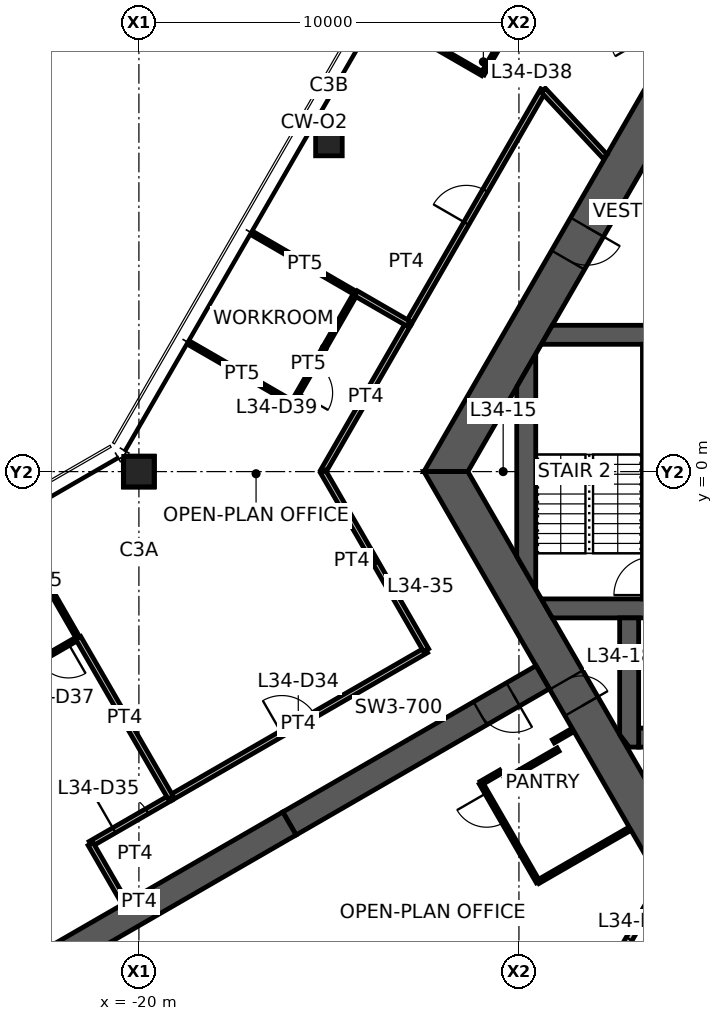
"""IFC4 building model, lengths in metres.
Left out: names, types, materials, properties, quantities, classifications, styles, units other than length and angle.
Written with IfcOpenShell. Run it as: python <this file> out.ifc"""

import sys

from ifc_helpers import new_model, si_unit, direction, frame, frame_2d, origin, origin_2d, place, context, subcontext, project, spatial, polyline, rectangle, hollow_rectangle, outline, extrude, element, fill, save


model = new_model("IFC4")
c1 = context("Model", 3, precision=1e-05, world=origin(), true_north=direction((0.0, 1.0)))
c2 = subcontext(c1, "Body", "Model", "MODEL_VIEW")
j1 = project(units=[si_unit("LENGTHUNIT", "METRE"), si_unit("PLANEANGLEUNIT", "RADIAN")], contexts=[c1])
p1 = place(None, origin())
s1 = spatial("IfcSite", under=j1, at=p1, CompositionType="ELEMENT")
p2 = place(p1, origin())
s2 = spatial("IfcBuilding", under=s1, at=p2, CompositionType="ELEMENT")
p3 = place(p2, frame((0.0, 0.0, 137.0)))
s3 = spatial("IfcBuildingStorey", under=s2, at=p3, CompositionType="ELEMENT", Elevation=137.0)
p4 = place(p3, frame((-20.0, 0.0, 0.0), z_axis=(0.0, 0.0, 1.0), x_axis=(1.0, 0.0, 0.0)))
e1 = element("IfcColumn", 1, at=p4, inside=s3, PredefinedType="COLUMN", context=c2, shape_type="SweptSolid", body=[
    extrude(hollow_rectangle(XDim=0.8, YDim=0.8, WallThickness=0.045, at=origin_2d()), origin(), (0.0, 0.0, 1.0), 3.9),
])
p5 = place(p3, frame((-15.0, 8.66, 0.0), z_axis=(0.0, 0.0, 1.0), x_axis=(1.0, 0.0, 0.0)))
e2 = element("IfcColumn", 2, at=p5, inside=s3, PredefinedType="COLUMN", context=c2, shape_type="SweptSolid", body=[
    extrude(hollow_rectangle(XDim=0.7, YDim=0.7, WallThickness=0.036, at=origin_2d()), origin(), (0.0, 0.0, 1.0), 3.9),
])
p6 = place(p3, frame((-5.961, 10.325, 0.0), z_axis=(0.0, 0.0, 1.0), x_axis=(-0.500004296715, -0.866022923061, 0.0)))
e3 = element("IfcWall", 3, at=p6, inside=s3, PredefinedType="SHEAR", context=c2, shape_type="SweptSolid", body=[
    extrude(outline(polyline([(-0.289, -0.5), (4.494, -0.5), (5.494, -0.5), (12.211, -0.5), (11.634, 0.5), (5.494, 0.5), (4.494, 0.5), (0.289, 0.5), (-0.289, -0.5)])), origin(), (0.0, 0.0, 1.0), 3.9),
])
p7 = place(p6, frame((4.494, 0.0, 0.0)))
e4 = element("IfcOpeningElement", 4, at=p7, cuts=e3, PredefinedType="OPENING", context=c2, shape_type="SweptSolid", body=[
    extrude(rectangle(XDim=1.0, YDim=2.1, at=frame_2d((0.5, 1.05))), frame((0.0, 0.51, 0.0), z_axis=(0.0, -1.0, 0.0), x_axis=(1.0, 0.0, 0.0)), (0.0, 0.0, 1.0), 1.02),
])
p8 = place(p3, frame((-11.922, 0.0, 0.0), z_axis=(0.0, 0.0, 1.0), x_axis=(0.500004296715, -0.866022923061, 0.0)))
e5 = element("IfcWall", 5, at=p8, inside=s3, PredefinedType="SHEAR", context=c2, shape_type="SweptSolid", body=[
    extrude(outline(polyline([(-0.289, -0.5), (6.331, -0.5), (7.131, -0.5), (12.211, -0.5), (11.634, 0.5), (7.131, 0.5), (6.331, 0.5), (0.289, 0.5), (-0.289, -0.5)])), origin(), (0.0, 0.0, 1.0), 3.9),
])
p9 = place(p8, frame((6.331, 0.0, 0.0)))
e6 = element("IfcOpeningElement", 6, at=p9, cuts=e5, PredefinedType="OPENING", context=c2, shape_type="SweptSolid", body=[
    extrude(rectangle(XDim=0.8, YDim=2.1, at=frame_2d((0.4, 1.05))), frame((0.0, 0.51, 0.0), z_axis=(0.0, -1.0, 0.0), x_axis=(1.0, 0.0, 0.0)), (0.0, 0.0, 1.0), 1.02),
])
p10 = place(p3, frame((-9.375, -5.413, 0.0), z_axis=(0.0, 0.0, 1.0), x_axis=(-0.866032377459, -0.499987921047, 0.0)))
e7 = element("IfcWall", 7, at=p10, inside=s3, PredefinedType="SHEAR", context=c2, shape_type="SweptSolid", body=[
    extrude(rectangle(XDim=7.696, YDim=0.7, at=frame_2d((3.848, 0.0))), origin(), (0.0, 0.0, 1.0), 3.9),
])
p11 = place(p10, frame((0.9, 0.0, 0.0)))
e8 = element("IfcOpeningElement", 8, at=p11, cuts=e7, PredefinedType="OPENING", context=c2, shape_type="SweptSolid", body=[
    extrude(rectangle(XDim=1.0, YDim=2.1, at=frame_2d((0.5, 1.05))), frame((0.0, 0.36, 0.0), z_axis=(0.0, -1.0, 0.0), x_axis=(1.0, 0.0, 0.0)), (0.0, 0.0, 1.0), 0.72),
])
p12 = place(p3, frame((-16.039, -9.26, 0.0), z_axis=(0.0, 0.0, 1.0), x_axis=(-0.866024837091, -0.50000098154, 0.0)))
e9 = element("IfcWall", 9, at=p12, inside=s3, PredefinedType="SHEAR", context=c2, shape_type="SweptSolid", body=[
    extrude(rectangle(XDim=13.0, YDim=0.7, at=frame_2d((6.5, 0.0))), origin(), (0.0, 0.0, 1.0), 3.9),
])
p13 = place(p3, frame((-9.266, 3.6, 0.0), z_axis=(0.0, 0.0, 1.0), x_axis=(1.0, 0.0, 0.0)))
e10 = element("IfcWall", 10, at=p13, inside=s3, PredefinedType="SHEAR", context=c2, shape_type="SweptSolid", body=[
    extrude(outline(polyline([(-0.144, -0.25), (3.266, -0.25), (4.266, -0.25), (5.667, -0.25), (6.767, -0.25), (7.916, -0.25), (7.916, 0.25), (6.767, 0.25), (5.667, 0.25), (4.266, 0.25), (3.266, 0.25), (0.144, 0.25), (-0.144, -0.25)])), origin(), (0.0, 0.0, 1.0), 3.9),
])
p14 = place(p13, frame((3.266, 0.0, 0.0)))
e11 = element("IfcOpeningElement", 11, at=p14, cuts=e10, PredefinedType="OPENING", context=c2, shape_type="SweptSolid", body=[
    extrude(rectangle(XDim=1.0, YDim=2.1, at=frame_2d((0.5, 1.05))), frame((0.0, 0.26, 0.0), z_axis=(0.0, -1.0, 0.0), x_axis=(1.0, 0.0, 0.0)), (0.0, 0.0, 1.0), 0.52),
])
p15 = place(p13, frame((5.667, 0.0, 0.0)))
e12 = element("IfcOpeningElement", 12, at=p15, cuts=e10, PredefinedType="OPENING", context=c2, shape_type="SweptSolid", body=[
    extrude(rectangle(XDim=1.1, YDim=2.1, at=frame_2d((0.55, 1.05))), frame((0.0, 0.26, 0.0), z_axis=(0.0, -1.0, 0.0), x_axis=(1.0, 0.0, 0.0)), (0.0, 0.0, 1.0), 0.52),
])
p16 = place(p3, frame((-9.266, -3.6, 0.0), z_axis=(0.0, 0.0, 1.0), x_axis=(1.0, 0.0, 0.0)))
e13 = element("IfcWall", 13, at=p16, inside=s3, PredefinedType="SHEAR", context=c2, shape_type="SweptSolid", body=[
    extrude(outline(polyline([(0.144, -0.25), (3.116, -0.25), (4.417, -0.25), (5.667, -0.25), (6.767, -0.25), (7.916, -0.25), (7.916, 0.25), (6.767, 0.25), (5.667, 0.25), (4.417, 0.25), (3.116, 0.25), (-0.144, 0.25), (0.144, -0.25)])), origin(), (0.0, 0.0, 1.0), 3.9),
])
p17 = place(p16, frame((5.667, 0.0, 0.0)))
e14 = element("IfcOpeningElement", 14, at=p17, cuts=e13, PredefinedType="OPENING", context=c2, shape_type="SweptSolid", body=[
    extrude(rectangle(XDim=1.1, YDim=2.1, at=frame_2d((0.55, 1.05))), frame((0.0, 0.26, 0.0), z_axis=(0.0, -1.0, 0.0), x_axis=(1.0, 0.0, 0.0)), (0.0, 0.0, 1.0), 0.52),
])
p18 = place(p16, frame((3.116, 0.0, 0.0)))
e15 = element("IfcOpeningElement", 15, at=p18, cuts=e13, PredefinedType="OPENING", context=c2, shape_type="SweptSolid", body=[
    extrude(rectangle(XDim=1.3, YDim=2.1, at=frame_2d((0.65, 1.05))), frame((0.0, 0.26, 0.0), z_axis=(0.0, -1.0, 0.0), x_axis=(1.0, 0.0, 0.0)), (0.0, 0.0, 1.0), 0.52),
])
p19 = place(p3, frame((-6.5, -3.35, 0.0), z_axis=(0.0, 0.0, 1.0), x_axis=(0.0, 1.0, 0.0)))
e16 = element("IfcWall", 16, at=p19, inside=s3, PredefinedType="SHEAR", context=c2, shape_type="SweptSolid", body=[
    extrude(rectangle(XDim=6.7, YDim=0.5, at=frame_2d((3.35, 0.0))), origin(), (0.0, 0.0, 1.0), 3.9),
])
p20 = place(p19, frame((0.1, 0.0, 0.0)))
e17 = element("IfcOpeningElement", 17, at=p20, cuts=e16, PredefinedType="OPENING", context=c2, shape_type="SweptSolid", body=[
    extrude(rectangle(XDim=1.0, YDim=2.1, at=frame_2d((0.5, 1.05))), frame((0.0, 0.26, 0.0), z_axis=(0.0, -1.0, 0.0), x_axis=(1.0, 0.0, 0.0)), (0.0, 0.0, 1.0), 0.52),
])
p21 = place(p3, frame((-6.85, -7.0, 0.0), z_axis=(0.0, 0.0, 1.0), x_axis=(1.0, 0.0, 0.0)))
e18 = element("IfcWall", 18, at=p21, inside=s3, PredefinedType="SHEAR", context=c2, shape_type="SweptSolid", body=[
    extrude(rectangle(XDim=2.1, YDim=0.5, at=frame_2d((1.05, 0.0))), origin(), (0.0, 0.0, 1.0), 3.9),
])
p22 = place(p3, frame((-7.1, -3.85, 0.0), z_axis=(0.0, 0.0, 1.0), x_axis=(0.0, -1.0, 0.0)))
e19 = element("IfcWall", 19, at=p22, inside=s3, PredefinedType="SHEAR", context=c2, shape_type="SweptSolid", body=[
    extrude(outline(polyline([(0.0, -0.25), (3.069, -0.25), (3.4, 0.0), (3.4, 0.25), (0.0, 0.25), (0.0, -0.25)])), origin(), (0.0, 0.0, 1.0), 3.9),
])
p23 = place(p3, frame((-9.808, -2.662, 0.0), z_axis=(0.0, 0.0, 1.0), x_axis=(0.0, 1.0, 0.0)))
e20 = element("IfcWall", 20, at=p23, inside=s3, PredefinedType="SHEAR", context=c2, shape_type="SweptSolid", body=[
    extrude(outline(polyline([(-0.433, -0.25), (5.758, -0.25), (4.892, 0.25), (0.433, 0.25), (-0.433, -0.25)])), origin(), (0.0, 0.0, 1.0), 3.9),
])
p24 = place(p3, frame((-6.035, 10.453, 0.0), z_axis=(0.0, 0.0, 1.0), x_axis=(-0.499989830942, 0.866031274813, 0.0)))
e21 = element("IfcWall", 21, at=p24, inside=s3, PredefinedType="PARTITIONING", context=c2, shape_type="SweptSolid", body=[
    extrude(rectangle(XDim=7.93, YDim=0.175, at=frame_2d((3.965, 0.0))), origin(), (0.0, 0.0, 1.0), 3.05),
])
p25 = place(p24, frame((1.13, 0.0, 0.0)))
e22 = element("IfcOpeningElement", 22, at=p25, cuts=e21, PredefinedType="OPENING", context=c2, shape_type="SweptSolid", body=[
    extrude(rectangle(XDim=1.0, YDim=2.1, at=frame_2d((0.5, 1.05))), frame((0.0, 0.098, 0.0), z_axis=(0.0, -1.0, 0.0), x_axis=(1.0, 0.0, 0.0)), (0.0, 0.0, 1.0), 0.195),
])
p26 = place(p3, frame((-6.035, -10.453, 0.0), z_axis=(0.0, 0.0, 1.0), x_axis=(-0.499989830942, -0.866031274813, 0.0)))
e23 = element("IfcWall", 23, at=p26, inside=s3, PredefinedType="PARTITIONING", context=c2, shape_type="SweptSolid", body=[
    extrude(rectangle(XDim=7.93, YDim=0.175, at=frame_2d((3.965, 0.0))), origin(), (0.0, 0.0, 1.0), 3.05),
])
p27 = place(p26, frame((1.13, 0.0, 0.0)))
e24 = element("IfcOpeningElement", 24, at=p27, cuts=e23, PredefinedType="OPENING", context=c2, shape_type="SweptSolid", body=[
    extrude(rectangle(XDim=1.0, YDim=2.1, at=frame_2d((0.5, 1.05))), frame((0.0, 0.098, 0.0), z_axis=(0.0, -1.0, 0.0), x_axis=(1.0, 0.0, 0.0)), (0.0, 0.0, 1.0), 0.195),
])
p28 = place(p3, frame((-19.171, -8.586, 0.0), z_axis=(0.0, 0.0, 1.0), x_axis=(0.866007176269, 0.500031569654, 0.0)))
e25 = element("IfcWall", 25, at=p28, inside=s3, PredefinedType="PARTITIONING", context=c2, shape_type="SweptSolid", body=[
    extrude(rectangle(XDim=7.771, YDim=0.15, at=frame_2d((3.885, 0.0))), origin(), (0.0, 0.0, 1.0), 2.95),
])
p29 = place(p28, frame((3.385, 0.0, 0.0)))
e26 = element("IfcOpeningElement", 26, at=p29, cuts=e25, PredefinedType="OPENING", context=c2, shape_type="SweptSolid", body=[
    extrude(rectangle(XDim=1.0, YDim=2.1, at=frame_2d((0.5, 1.05))), frame((0.0, 0.085, 0.0), z_axis=(0.0, -1.0, 0.0), x_axis=(1.0, 0.0, 0.0)), (0.0, 0.0, 1.0), 0.17),
])
p30 = place(p3, frame((-15.156, 0.0, 0.0), z_axis=(0.0, 0.0, 1.0), x_axis=(0.500014848696, 0.866016830716, 0.0)))
e27 = element("IfcWall", 27, at=p30, inside=s3, PredefinedType="PARTITIONING", context=c2, shape_type="SweptSolid", body=[
    extrude(rectangle(XDim=4.505, YDim=0.15, at=frame_2d((2.252, 0.0))), origin(), (0.0, 0.0, 1.0), 2.95),
])
p31 = place(p3, frame((-12.442, -4.7, 0.0), z_axis=(0.0, 0.0, 1.0), x_axis=(-0.500009286329, 0.866020042254, 0.0)))
e28 = element("IfcWall", 28, at=p31, inside=s3, PredefinedType="PARTITIONING", context=c2, shape_type="SweptSolid", body=[
    extrude(rectangle(XDim=5.428, YDim=0.15, at=frame_2d((2.714, 0.0))), origin(), (0.0, 0.0, 1.0), 2.95),
])
p32 = place(p3, frame((-21.271, -9.798, 0.0), z_axis=(0.0, 0.0, 1.0), x_axis=(0.866025270247, 0.500000231294, 0.0)))
e29 = element("IfcWall", 29, at=p32, inside=s3, PredefinedType="PARTITIONING", context=c2, shape_type="SweptSolid", body=[
    extrude(rectangle(XDim=2.435, YDim=0.15, at=frame_2d((1.217, 0.0))), origin(), (0.0, 0.0, 1.0), 2.95),
])
p33 = place(p32, frame((0.717, 0.0, 0.0)))
e30 = element("IfcOpeningElement", 30, at=p33, cuts=e29, PredefinedType="OPENING", context=c2, shape_type="SweptSolid", body=[
    extrude(rectangle(XDim=1.0, YDim=2.1, at=frame_2d((0.5, 1.05))), frame((0.0, 0.085, 0.0), z_axis=(0.0, -1.0, 0.0), x_axis=(1.0, 0.0, 0.0)), (0.0, 0.0, 1.0), 0.17),
])
p34 = place(p3, frame((-20.381, -11.34, 0.0), z_axis=(0.0, 0.0, 1.0), x_axis=(-0.500062787734, 0.865989150234, 0.0)))
e31 = element("IfcWall", 31, at=p34, inside=s3, PredefinedType="PARTITIONING", context=c2, shape_type="SweptSolid", body=[
    extrude(rectangle(XDim=1.78, YDim=0.15, at=frame_2d((0.89, 0.0))), origin(), (0.0, 0.0, 1.0), 2.95),
])
p35 = place(p3, frame((-12.908, 3.893, 0.0), z_axis=(0.0, 0.0, 1.0), x_axis=(0.500006411147, 0.866021702275, 0.0)))
e32 = element("IfcWall", 32, at=p35, inside=s3, PredefinedType="PARTITIONING", context=c2, shape_type="SweptSolid", body=[
    extrude(rectangle(XDim=7.095, YDim=0.15, at=frame_2d((3.548, 0.0))), origin(), (0.0, 0.0, 1.0), 2.95),
])
p36 = place(p35, frame((3.047, 0.0, 0.0)))
e33 = element("IfcOpeningElement", 33, at=p36, cuts=e32, PredefinedType="OPENING", context=c2, shape_type="SweptSolid", body=[
    extrude(rectangle(XDim=1.0, YDim=2.1, at=frame_2d((0.5, 1.05))), frame((0.0, 0.085, 0.0), z_axis=(0.0, -1.0, 0.0), x_axis=(1.0, 0.0, 0.0)), (0.0, 0.0, 1.0), 0.17),
])
p37 = place(p3, frame((-9.36, 10.038, 0.0), z_axis=(0.0, 0.0, 1.0), x_axis=(0.681997114248, -0.731354863358, 0.0)))
e34 = element("IfcWall", 34, at=p37, inside=s3, PredefinedType="PARTITIONING", context=c2, shape_type="SweptSolid", body=[
    extrude(outline(polyline([(0.0, -0.075), (2.384, -0.075), (2.384, 0.0), (2.382, 0.075), (0.0, 0.075), (0.0, -0.075)])), origin(), (0.0, 0.0, 1.0), 2.95),
])
p38 = place(p3, frame((-23.332, -1.37, 0.0), z_axis=(0.0, 0.0, 1.0), x_axis=(0.498863855434, -0.86668036423, 0.0)))
e35 = element("IfcWall", 35, at=p38, inside=s3, PredefinedType="PARTITIONING", context=c2, shape_type="SweptSolid", body=[
    extrude(rectangle(XDim=3.48, YDim=0.1, at=frame_2d((1.74, 0.0))), origin(), (0.0, 0.0, 1.0), 2.95),
])
p39 = place(p3, frame((-21.594, -4.379, 0.0), z_axis=(0.0, 0.0, 1.0), x_axis=(-0.865682888643, -0.500592784916, 0.0)))
e36 = element("IfcWall", 36, at=p39, inside=s3, PredefinedType="PARTITIONING", context=c2, shape_type="SweptSolid", body=[
    extrude(rectangle(XDim=6.62, YDim=0.1, at=frame_2d((3.31, 0.0))), origin(), (0.0, 0.0, 1.0), 2.95),
])
p40 = place(p39, frame((0.3, 0.0, 0.0)))
e37 = element("IfcOpeningElement", 37, at=p40, cuts=e36, PredefinedType="OPENING", context=c2, shape_type="SweptSolid", body=[
    extrude(rectangle(XDim=0.9, YDim=2.1, at=frame_2d((0.45, 1.05))), frame((0.0, 0.06, 0.0), z_axis=(0.0, -1.0, 0.0), x_axis=(1.0, 0.0, 0.0)), (0.0, 0.0, 1.0), 0.12),
])
p41 = place(p3, frame((-10.956, 10.465, 0.0), z_axis=(0.0, 0.0, 1.0), x_axis=(-0.866044340336, 0.499967199496, 0.0)))
e38 = element("IfcWall", 38, at=p41, inside=s3, PredefinedType="PARTITIONING", context=c2, shape_type="SweptSolid", body=[
    extrude(rectangle(XDim=3.08, YDim=0.1, at=frame_2d((1.54, 0.0))), origin(), (0.0, 0.0, 1.0), 2.95),
])
p42 = place(p3, frame((-9.291, 13.349, 0.0), z_axis=(0.0, 0.0, 1.0), x_axis=(-0.500033344505, -0.86600615147, 0.0)))
e39 = element("IfcWall", 39, at=p42, inside=s3, PredefinedType="PARTITIONING", context=c2, shape_type="SweptSolid", body=[
    extrude(rectangle(XDim=3.331, YDim=0.1, at=frame_2d((1.666, 0.0))), origin(), (0.0, 0.0, 1.0), 2.95),
])
p43 = place(p42, frame((0.3, 0.0, 0.0)))
e40 = element("IfcOpeningElement", 40, at=p43, cuts=e39, PredefinedType="OPENING", context=c2, shape_type="SweptSolid", body=[
    extrude(rectangle(XDim=0.9, YDim=2.1, at=frame_2d((0.45, 1.05))), frame((0.0, 0.06, 0.0), z_axis=(0.0, -1.0, 0.0), x_axis=(1.0, 0.0, 0.0)), (0.0, 0.0, 1.0), 0.12),
])
p44 = place(p3, frame((-15.952, 1.811, 0.0), z_axis=(0.0, 0.0, 1.0), x_axis=(-0.866029832698, 0.499992328818, 0.0)))
e41 = element("IfcWall", 41, at=p44, inside=s3, PredefinedType="PARTITIONING", context=c2, shape_type="SweptSolid", body=[
    extrude(rectangle(XDim=3.08, YDim=0.1, at=frame_2d((1.54, 0.0))), origin(), (0.0, 0.0, 1.0), 2.95),
])
p45 = place(p3, frame((-14.291, 4.698, 0.0), z_axis=(0.0, 0.0, 1.0), x_axis=(-0.498780940327, -0.866728085138, 0.0)))
e42 = element("IfcWall", 42, at=p45, inside=s3, PredefinedType="PARTITIONING", context=c2, shape_type="SweptSolid", body=[
    extrude(rectangle(XDim=3.331, YDim=0.1, at=frame_2d((1.666, 0.0))), origin(), (0.0, 0.0, 1.0), 2.95),
])
p46 = place(p45, frame((2.131, 0.0, 0.0)))
e43 = element("IfcOpeningElement", 43, at=p46, cuts=e42, PredefinedType="OPENING", context=c2, shape_type="SweptSolid", body=[
    extrude(rectangle(XDim=0.9, YDim=2.1, at=frame_2d((0.45, 1.05))), frame((0.0, 0.06, 0.0), z_axis=(0.0, -1.0, 0.0), x_axis=(1.0, 0.0, 0.0)), (0.0, 0.0, 1.0), 0.12),
])
p47 = place(p3, frame((-16.976, 6.248, 0.0), z_axis=(0.0, 0.0, 1.0), x_axis=(0.865232439327, -0.501370946442, 0.0)))
e44 = element("IfcWall", 44, at=p47, inside=s3, PredefinedType="PARTITIONING", context=c2, shape_type="SweptSolid", body=[
    extrude(rectangle(XDim=3.105, YDim=0.1, at=frame_2d((1.553, 0.0))), origin(), (0.0, 0.0, 1.0), 2.95),
])
p48 = place(p3, frame((-19.163, -8.581, 0.0), z_axis=(0.0, 0.0, 1.0), x_axis=(-0.500843945189, 0.865537603209, 0.0)))
e45 = element("IfcWall", 45, at=p48, inside=s3, PredefinedType="PARTITIONING", context=c2, shape_type="SweptSolid", body=[
    extrude(rectangle(XDim=4.854, YDim=0.15, at=frame_2d((2.427, 0.0))), origin(), (0.0, 0.0, 1.0), 2.95),
])
p49 = place(p3, frame((-14.289, 4.691, 0.0), z_axis=(0.0, 0.0, 1.0), x_axis=(0.865925490132, -0.500173015605, 0.0)))
e46 = element("IfcWall", 46, at=p49, inside=s3, PredefinedType="PARTITIONING", context=c2, shape_type="SweptSolid", body=[
    extrude(rectangle(XDim=1.595, YDim=0.15, at=frame_2d((0.797, 0.0))), origin(), (0.0, 0.0, 1.0), 2.95),
])
p50 = place(p3, frame((-11.0, -8.198, 0.0), z_axis=(0.0, 0.0, 1.0), x_axis=(0.866131372301, 0.499816412211, 0.0)))
e47 = element("IfcWall", 47, at=p50, inside=s3, PredefinedType="PARTITIONING", context=c2, shape_type="SweptSolid", body=[
    extrude(rectangle(XDim=0.6, YDim=0.1, at=frame_2d((0.3, 0.0))), origin(), (0.0, 0.0, 1.0), 2.95),
])
p51 = place(p3, frame((-10.355, -8.115, 0.0), z_axis=(0.0, 0.0, 1.0), x_axis=(0.866094119867, 0.499880961361, 0.0)))
e48 = element("IfcWall", 48, at=p51, inside=s3, PredefinedType="PARTITIONING", context=c2, shape_type="SweptSolid", body=[
    extrude(rectangle(XDim=1.6, YDim=0.1, at=frame_2d((0.8, 0.0))), origin(), (0.0, 0.0, 1.0), 2.95),
])
p52 = place(p3, frame((-9.5, -10.796, 0.0), z_axis=(0.0, 0.0, 1.0), x_axis=(-0.499990139034, 0.866031096941, 0.0)))
e49 = element("IfcWall", 49, at=p52, inside=s3, PredefinedType="PARTITIONING", context=c2, shape_type="SweptSolid", body=[
    extrude(rectangle(XDim=3.0, YDim=0.1, at=frame_2d((1.5, 0.0))), origin(), (0.0, 0.0, 1.0), 2.95),
])
p53 = place(p52, frame((1.8, 0.0, 0.0)))
e50 = element("IfcOpeningElement", 50, at=p53, cuts=e49, PredefinedType="OPENING", context=c2, shape_type="SweptSolid", body=[
    extrude(rectangle(XDim=0.9, YDim=2.1, at=frame_2d((0.45, 1.05))), frame((0.0, 0.06, 0.0), z_axis=(0.0, -1.0, 0.0), x_axis=(1.0, 0.0, 0.0)), (0.0, 0.0, 1.0), 0.12),
])
p54 = place(p3, frame((-9.094, -7.098, 0.0), z_axis=(0.0, 0.0, 1.0), x_axis=(0.865954211699, 0.50012328804, 0.0)))
e51 = element("IfcWall", 51, at=p54, inside=s3, PredefinedType="PARTITIONING", context=c2, shape_type="SweptSolid", body=[
    extrude(rectangle(XDim=0.58, YDim=0.1, at=frame_2d((0.29, 0.0))), origin(), (0.0, 0.0, 1.0), 2.95),
])
p55 = place(p3, frame((-7.092, -9.406, 0.0), z_axis=(0.0, 0.0, 1.0), x_axis=(-0.86603494908, -0.499983466698, 0.0)))
e52 = element("IfcWall", 52, at=p55, inside=s3, PredefinedType="PARTITIONING", context=c2, shape_type="SweptSolid", body=[
    extrude(rectangle(XDim=2.78, YDim=0.1, at=frame_2d((1.39, 0.0))), origin(), (0.0, 0.0, 1.0), 2.95),
])
p56 = place(p9, origin())
e53 = element("IfcDoor", 53, at=p56, inside=s3, OperationType="SINGLE_SWING_RIGHT", PredefinedType="DOOR", context=c2, shape_type="SweptSolid", body=[
    extrude(rectangle(XDim=0.8, YDim=2.1, at=frame_2d((0.4, 1.05))), frame((0.0, 0.025, 0.0), z_axis=(0.0, -1.0, 0.0), x_axis=(1.0, 0.0, 0.0)), (0.0, 0.0, 1.0), 0.05),
])
fill(e6, e53)
p57 = place(p7, origin())
e54 = element("IfcDoor", 54, at=p57, inside=s3, OperationType="SINGLE_SWING_LEFT", PredefinedType="DOOR", context=c2, shape_type="SweptSolid", body=[
    extrude(rectangle(XDim=1.0, YDim=2.1, at=frame_2d((0.5, 1.05))), frame((0.0, 0.025, 0.0), z_axis=(0.0, -1.0, 0.0), x_axis=(1.0, 0.0, 0.0)), (0.0, 0.0, 1.0), 0.05),
])
fill(e4, e54)
p58 = place(p11, origin())
e55 = element("IfcDoor", 55, at=p58, inside=s3, OperationType="SINGLE_SWING_LEFT", PredefinedType="DOOR", context=c2, shape_type="SweptSolid", body=[
    extrude(rectangle(XDim=1.0, YDim=2.1, at=frame_2d((0.5, 1.05))), frame((0.0, 0.025, 0.0), z_axis=(0.0, -1.0, 0.0), x_axis=(1.0, 0.0, 0.0)), (0.0, 0.0, 1.0), 0.05),
])
fill(e8, e55)
p59 = place(p27, origin())
e56 = element("IfcDoor", 56, at=p59, inside=s3, OperationType="SINGLE_SWING_LEFT", PredefinedType="DOOR", context=c2, shape_type="SweptSolid", body=[
    extrude(rectangle(XDim=1.0, YDim=2.1, at=frame_2d((0.5, 1.05))), frame((0.0, 0.025, 0.0), z_axis=(0.0, -1.0, 0.0), x_axis=(1.0, 0.0, 0.0)), (0.0, 0.0, 1.0), 0.05),
])
fill(e24, e56)
p60 = place(p29, origin())
e57 = element("IfcDoor", 57, at=p60, inside=s3, OperationType="SINGLE_SWING_LEFT", PredefinedType="DOOR", context=c2, shape_type="SweptSolid", body=[
    extrude(rectangle(XDim=1.0, YDim=2.1, at=frame_2d((0.5, 1.05))), frame((0.0, 0.025, 0.0), z_axis=(0.0, -1.0, 0.0), x_axis=(1.0, 0.0, 0.0)), (0.0, 0.0, 1.0), 0.05),
])
fill(e26, e57)
p61 = place(p33, origin())
e58 = element("IfcDoor", 58, at=p61, inside=s3, OperationType="SINGLE_SWING_LEFT", PredefinedType="DOOR", context=c2, shape_type="SweptSolid", body=[
    extrude(rectangle(XDim=1.0, YDim=2.1, at=frame_2d((0.5, 1.05))), frame((0.0, 0.025, 0.0), z_axis=(0.0, -1.0, 0.0), x_axis=(1.0, 0.0, 0.0)), (0.0, 0.0, 1.0), 0.05),
])
fill(e30, e58)
p62 = place(p36, origin())
e59 = element("IfcDoor", 59, at=p62, inside=s3, OperationType="SINGLE_SWING_LEFT", PredefinedType="DOOR", context=c2, shape_type="SweptSolid", body=[
    extrude(rectangle(XDim=1.0, YDim=2.1, at=frame_2d((0.5, 1.05))), frame((0.0, 0.025, 0.0), z_axis=(0.0, -1.0, 0.0), x_axis=(1.0, 0.0, 0.0)), (0.0, 0.0, 1.0), 0.05),
])
fill(e33, e59)
p63 = place(p40, origin())
e60 = element("IfcDoor", 60, at=p63, inside=s3, OperationType="SINGLE_SWING_LEFT", PredefinedType="DOOR", context=c2, shape_type="SweptSolid", body=[
    extrude(rectangle(XDim=0.9, YDim=2.1, at=frame_2d((0.45, 1.05))), frame((0.0, 0.025, 0.0), z_axis=(0.0, -1.0, 0.0), x_axis=(1.0, 0.0, 0.0)), (0.0, 0.0, 1.0), 0.05),
])
fill(e37, e60)
p64 = place(p46, origin())
e61 = element("IfcDoor", 61, at=p64, inside=s3, OperationType="SINGLE_SWING_RIGHT", PredefinedType="DOOR", context=c2, shape_type="SweptSolid", body=[
    extrude(rectangle(XDim=0.9, YDim=2.1, at=frame_2d((0.45, 1.05))), frame((0.0, 0.025, 0.0), z_axis=(0.0, -1.0, 0.0), x_axis=(1.0, 0.0, 0.0)), (0.0, 0.0, 1.0), 0.05),
])
fill(e43, e61)
p65 = place(p53, origin())
e62 = element("IfcDoor", 62, at=p65, inside=s3, OperationType="SINGLE_SWING_RIGHT", PredefinedType="DOOR", context=c2, shape_type="SweptSolid", body=[
    extrude(rectangle(XDim=0.9, YDim=2.1, at=frame_2d((0.45, 1.05))), frame((0.0, 0.025, 0.0), z_axis=(0.0, -1.0, 0.0), x_axis=(1.0, 0.0, 0.0)), (0.0, 0.0, 1.0), 0.05),
])
fill(e50, e62)
save(model, sys.argv[1])
